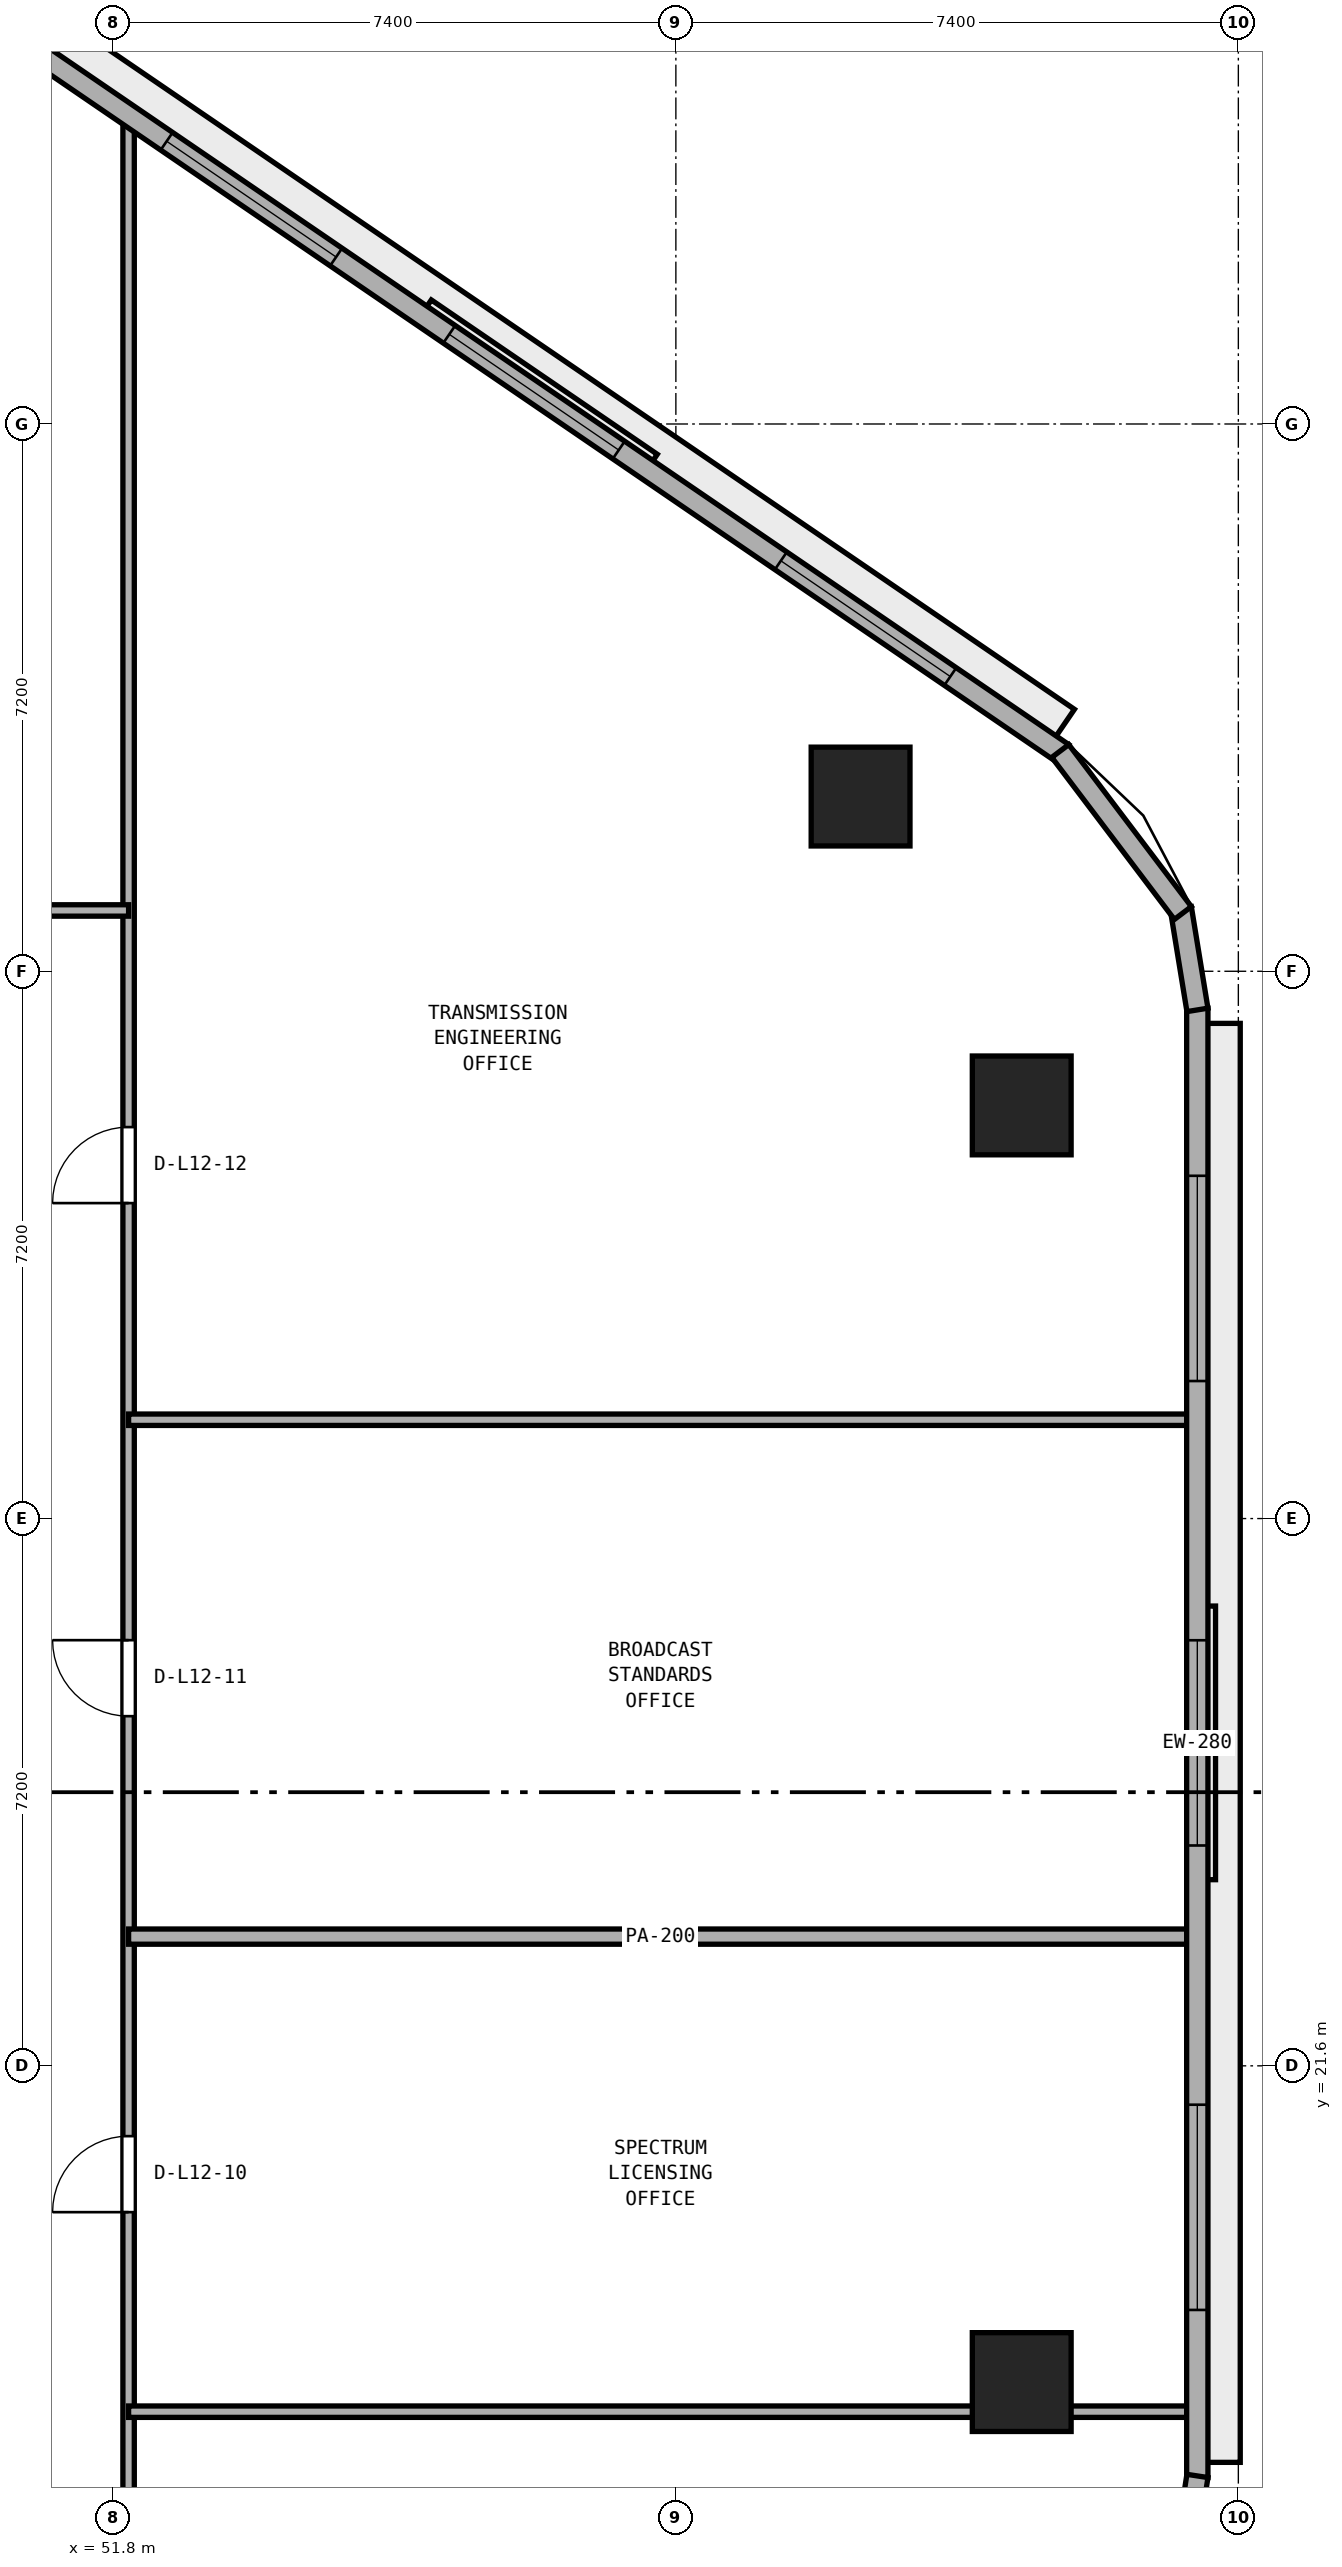
"""IFC4 building model, lengths in metres.
Left out: names, types, materials, properties, quantities, classifications, styles, units other than length and angle.
Written with IfcOpenShell. Run it as: python <this file> out.ifc"""

import sys

from ifc_helpers import new_model, si_unit, direction, frame, frame_2d, origin, origin_2d, place, context, subcontext, project, spatial, rectangle, extrude, element, fill, save


model = new_model("IFC4")
c1 = context("Model", 3, precision=1e-05, world=origin(), true_north=direction((0.0, 1.0)))
c2 = subcontext(c1, "Body", "Model", "MODEL_VIEW")
j1 = project(units=[si_unit("LENGTHUNIT", "METRE"), si_unit("PLANEANGLEUNIT", "RADIAN")], contexts=[c1])
p1 = place(None, origin())
s1 = spatial("IfcSite", under=j1, at=p1, CompositionType="ELEMENT")
p2 = place(p1, origin())
s2 = spatial("IfcBuilding", under=s1, at=p2, CompositionType="ELEMENT")
p3 = place(p2, frame((0.0, 0.0, 51.6)))
s3 = spatial("IfcBuildingStorey", under=s2, at=p3, CompositionType="ELEMENT", Elevation=51.6)
for number, where, z_axis, x_axis in (
    (1, (63.75, 17.44, 0.0), (0.0, 0.0, 1.0), (1.0, 0.0, 0.0)),
    (2, (63.75, 34.235, 0.0), (0.0, 0.0, 1.0), (1.0, 0.0, 0.0)),
    (3, (61.63, 38.299, 0.0), (0.0, 0.0, 1.0), (1.0, 0.0, 0.0)),
):
    element("IfcColumn", number, at=place(p3, frame(where, z_axis=z_axis, x_axis=x_axis)), inside=s3, PredefinedType="COLUMN", context=c2, shape_type="SweptSolid", body=[
        extrude(rectangle(XDim=1.3, YDim=1.3, at=origin_2d()), origin(), (0.0, 0.0, 1.0), 3.8),
    ])
p4 = place(p3, frame((52.0, 13.6, 0.0), z_axis=(0.0, 0.0, 1.0), x_axis=(0.0, 1.0, 0.0)))
e4 = element("IfcWall", 4, at=p4, inside=s3, PredefinedType="PARTITIONING", context=c2, shape_type="SweptSolid", body=[
    extrude(rectangle(XDim=33.691, YDim=0.15, at=frame_2d((16.846, 0.0))), origin(), (0.0, 0.0, 1.0), 3.525),
])
p5 = place(p4, frame((6.075, 0.0, 0.0)))
e5 = element("IfcOpeningElement", 5, at=p5, cuts=e4, PredefinedType="OPENING", context=c2, shape_type="SweptSolid", body=[
    extrude(rectangle(XDim=1.0, YDim=2.12, at=frame_2d((0.5, 1.06))), frame((0.0, 0.085, 0.0), z_axis=(0.0, -1.0, 0.0), x_axis=(1.0, 0.0, 0.0)), (0.0, 0.0, 1.0), 0.17),
])
p6 = place(p4, frame((12.6, 0.0, 0.0)))
e6 = element("IfcOpeningElement", 6, at=p6, cuts=e4, PredefinedType="OPENING", context=c2, shape_type="SweptSolid", body=[
    extrude(rectangle(XDim=1.0, YDim=2.12, at=frame_2d((0.5, 1.06))), frame((0.0, 0.085, 0.0), z_axis=(0.0, -1.0, 0.0), x_axis=(1.0, 0.0, 0.0)), (0.0, 0.0, 1.0), 0.17),
])
p7 = place(p4, frame((19.35, 0.0, 0.0)))
e7 = element("IfcOpeningElement", 7, at=p7, cuts=e4, PredefinedType="OPENING", context=c2, shape_type="SweptSolid", body=[
    extrude(rectangle(XDim=1.0, YDim=2.12, at=frame_2d((0.5, 1.06))), frame((0.0, 0.085, 0.0), z_axis=(0.0, -1.0, 0.0), x_axis=(1.0, 0.0, 0.0)), (0.0, 0.0, 1.0), 0.17),
])
p8 = place(p3, frame((52.0, 17.05, 0.0), z_axis=(0.0, 0.0, 1.0), x_axis=(1.0, 0.0, 0.0)))
e8 = element("IfcWall", 8, at=p8, inside=s3, PredefinedType="PARTITIONING", context=c2, shape_type="SweptSolid", body=[
    extrude(rectangle(XDim=13.995, YDim=0.15, at=frame_2d((6.998, 0.0))), origin(), (0.0, 0.0, 1.0), 3.525),
])
p9 = place(p3, frame((52.0, 23.3, 0.0), z_axis=(0.0, 0.0, 1.0), x_axis=(1.0, 0.0, 0.0)))
e9 = element("IfcWall", 9, at=p9, inside=s3, PredefinedType="PARTITIONING", context=c2, shape_type="SweptSolid", body=[
    extrude(rectangle(XDim=13.995, YDim=0.2, at=frame_2d((6.998, 0.0))), origin(), (0.0, 0.0, 1.0), 3.525),
])
p10 = place(p3, frame((52.0, 30.1, 0.0), z_axis=(0.0, 0.0, 1.0), x_axis=(1.0, 0.0, 0.0)))
e10 = element("IfcWall", 10, at=p10, inside=s3, PredefinedType="PARTITIONING", context=c2, shape_type="SweptSolid", body=[
    extrude(rectangle(XDim=13.995, YDim=0.15, at=frame_2d((6.998, 0.0))), origin(), (0.0, 0.0, 1.0), 3.525),
])
p11 = place(p3, frame((22.0, 36.8, 0.0), z_axis=(0.0, 0.0, 1.0), x_axis=(1.0, 0.0, 0.0)))
e11 = element("IfcWall", 11, at=p11, inside=s3, PredefinedType="PARTITIONING", context=c2, shape_type="SweptSolid", body=[
    extrude(rectangle(XDim=30.0, YDim=0.15, at=frame_2d((15.0, 0.0))), origin(), (0.0, 0.0, 1.0), 3.525),
])
p12 = place(p11, frame((3.67, 0.0, 0.0)))
e12 = element("IfcOpeningElement", 12, at=p12, cuts=e11, PredefinedType="OPENING", context=c2, shape_type="SweptSolid", body=[
    extrude(rectangle(XDim=1.0, YDim=2.12, at=frame_2d((0.5, 1.06))), frame((0.0, 0.085, 0.0), z_axis=(0.0, -1.0, 0.0), x_axis=(1.0, 0.0, 0.0)), (0.0, 0.0, 1.0), 0.17),
])
p13 = place(p11, frame((11.9, 0.0, 0.0)))
e13 = element("IfcOpeningElement", 13, at=p13, cuts=e11, PredefinedType="OPENING", context=c2, shape_type="SweptSolid", body=[
    extrude(rectangle(XDim=1.0, YDim=2.12, at=frame_2d((0.5, 1.06))), frame((0.0, 0.085, 0.0), z_axis=(0.0, -1.0, 0.0), x_axis=(1.0, 0.0, 0.0)), (0.0, 0.0, 1.0), 0.17),
])
p14 = place(p11, frame((20.4, 0.0, 0.0)))
e14 = element("IfcOpeningElement", 14, at=p14, cuts=e11, PredefinedType="OPENING", context=c2, shape_type="SweptSolid", body=[
    extrude(rectangle(XDim=1.0, YDim=2.12, at=frame_2d((0.5, 1.06))), frame((0.0, 0.085, 0.0), z_axis=(0.0, -1.0, 0.0), x_axis=(1.0, 0.0, 0.0)), (0.0, 0.0, 1.0), 0.17),
])
p15 = place(p11, frame((26.93, 0.0, 0.0)))
e15 = element("IfcOpeningElement", 15, at=p15, cuts=e11, PredefinedType="OPENING", context=c2, shape_type="SweptSolid", body=[
    extrude(rectangle(XDim=1.0, YDim=2.12, at=frame_2d((0.5, 1.06))), frame((0.0, 0.085, 0.0), z_axis=(0.0, -1.0, 0.0), x_axis=(1.0, 0.0, 0.0)), (0.0, 0.0, 1.0), 0.17),
])
p16 = place(p3, frame((66.06, 16.183, 0.0), z_axis=(0.0, 0.0, 1.0), x_axis=(0.0, 1.0, 0.0)))
e16 = element("IfcWall", 16, at=p16, inside=s3, PredefinedType="STANDARD", context=c2, shape_type="SweptSolid", body=[
    extrude(rectangle(XDim=19.331, YDim=0.28, at=frame_2d((9.666, 0.0))), origin(), (0.0, 0.0, 1.0), 3.525),
])
p17 = place(p16, frame((2.205, 0.0, 0.9)))
e17 = element("IfcOpeningElement", 17, at=p17, cuts=e16, PredefinedType="OPENING", context=c2, shape_type="SweptSolid", body=[
    extrude(rectangle(XDim=2.7, YDim=1.75, at=frame_2d((1.35, 0.875))), frame((0.0, 0.15, 0.0), z_axis=(0.0, -1.0, 0.0), x_axis=(1.0, 0.0, 0.0)), (0.0, 0.0, 1.0), 0.3),
])
p18 = place(p16, frame((8.315, 0.0, 0.9)))
e18 = element("IfcOpeningElement", 18, at=p18, cuts=e16, PredefinedType="OPENING", context=c2, shape_type="SweptSolid", body=[
    extrude(rectangle(XDim=2.7, YDim=1.75, at=frame_2d((1.35, 0.875))), frame((0.0, 0.15, 0.0), z_axis=(0.0, -1.0, 0.0), x_axis=(1.0, 0.0, 0.0)), (0.0, 0.0, 1.0), 0.3),
])
p19 = place(p16, frame((14.426, 0.0, 0.9)))
e19 = element("IfcOpeningElement", 19, at=p19, cuts=e16, PredefinedType="OPENING", context=c2, shape_type="SweptSolid", body=[
    extrude(rectangle(XDim=2.7, YDim=1.75, at=frame_2d((1.35, 0.875))), frame((0.0, 0.15, 0.0), z_axis=(0.0, -1.0, 0.0), x_axis=(1.0, 0.0, 0.0)), (0.0, 0.0, 1.0), 0.3),
])
p20 = place(p3, frame((64.29, 38.867, 0.0), z_axis=(0.0, 0.0, 1.0), x_axis=(-0.825755550159, 0.564028165416, 0.0)))
e20 = element("IfcWall", 20, at=p20, inside=s3, PredefinedType="STANDARD", context=c2, shape_type="SweptSolid", body=[
    extrude(rectangle(XDim=16.848, YDim=0.28, at=frame_2d((8.424, 0.0))), origin(), (0.0, 0.0, 1.0), 3.525),
])
p21 = place(p20, frame((1.792, 0.0, 0.9)))
e21 = element("IfcOpeningElement", 21, at=p21, cuts=e20, PredefinedType="OPENING", context=c2, shape_type="SweptSolid", body=[
    extrude(rectangle(XDim=2.7, YDim=1.75, at=frame_2d((1.35, 0.875))), frame((0.0, 0.15, 0.0), z_axis=(0.0, -1.0, 0.0), x_axis=(1.0, 0.0, 0.0)), (0.0, 0.0, 1.0), 0.3),
])
p22 = place(p20, frame((7.074, 0.0, 0.9)))
e22 = element("IfcOpeningElement", 22, at=p22, cuts=e20, PredefinedType="OPENING", context=c2, shape_type="SweptSolid", body=[
    extrude(rectangle(XDim=2.7, YDim=1.75, at=frame_2d((1.35, 0.875))), frame((0.0, 0.15, 0.0), z_axis=(0.0, -1.0, 0.0), x_axis=(1.0, 0.0, 0.0)), (0.0, 0.0, 1.0), 0.3),
])
p23 = place(p20, frame((11.577, 0.0, 0.9)))
e23 = element("IfcOpeningElement", 23, at=p23, cuts=e20, PredefinedType="OPENING", context=c2, shape_type="SweptSolid", body=[
    extrude(rectangle(XDim=2.7, YDim=1.75, at=frame_2d((1.35, 0.875))), frame((0.0, 0.15, 0.0), z_axis=(0.0, -1.0, 0.0), x_axis=(1.0, 0.0, 0.0)), (0.0, 0.0, 1.0), 0.3),
])
p24 = place(p3, frame((65.867, 14.943, 0.0), z_axis=(0.0, 0.0, 1.0), x_axis=(0.152014078361, 0.988378328364, 0.0)))
e24 = element("IfcWall", 24, at=p24, inside=s3, PredefinedType="STANDARD", context=c2, shape_type="SweptSolid", body=[
    extrude(rectangle(XDim=1.277, YDim=0.28, at=frame_2d((0.638, 0.0))), origin(), (0.0, 0.0, 1.0), 3.525),
])
p25 = place(p3, frame((66.062, 35.492, 0.0), z_axis=(0.0, 0.0, 1.0), x_axis=(-0.161182073582, 0.986924687682, 0.0)))
e25 = element("IfcWall", 25, at=p25, inside=s3, PredefinedType="STANDARD", context=c2, shape_type="SweptSolid", body=[
    extrude(rectangle(XDim=1.354, YDim=0.28, at=frame_2d((0.677, 0.0))), origin(), (0.0, 0.0, 1.0), 3.525),
])
p26 = place(p3, frame((65.87, 36.767, 0.0), z_axis=(0.0, 0.0, 1.0), x_axis=(-0.603370463754, 0.797461023166, 0.0)))
e26 = element("IfcWall", 26, at=p26, inside=s3, PredefinedType="STANDARD", context=c2, shape_type="SweptSolid", body=[
    extrude(rectangle(XDim=2.673, YDim=0.28, at=frame_2d((1.336, 0.0))), origin(), (0.0, 0.0, 1.0), 3.525),
])
p27 = place(p5, origin())
e27 = element("IfcDoor", 27, at=p27, inside=s3, OperationType="SINGLE_SWING_LEFT", PredefinedType="DOOR", context=c2, shape_type="SweptSolid", body=[
    extrude(rectangle(XDim=1.0, YDim=2.12, at=frame_2d((0.5, 1.06))), frame((0.0, 0.025, 0.0), z_axis=(0.0, -1.0, 0.0), x_axis=(1.0, 0.0, 0.0)), (0.0, 0.0, 1.0), 0.05),
])
fill(e5, e27)
p28 = place(p6, origin())
e28 = element("IfcDoor", 28, at=p28, inside=s3, OperationType="SINGLE_SWING_RIGHT", PredefinedType="DOOR", context=c2, shape_type="SweptSolid", body=[
    extrude(rectangle(XDim=1.0, YDim=2.12, at=frame_2d((0.5, 1.06))), frame((0.0, 0.025, 0.0), z_axis=(0.0, -1.0, 0.0), x_axis=(1.0, 0.0, 0.0)), (0.0, 0.0, 1.0), 0.05),
])
fill(e6, e28)
p29 = place(p7, origin())
e29 = element("IfcDoor", 29, at=p29, inside=s3, OperationType="SINGLE_SWING_LEFT", PredefinedType="DOOR", context=c2, shape_type="SweptSolid", body=[
    extrude(rectangle(XDim=1.0, YDim=2.12, at=frame_2d((0.5, 1.06))), frame((0.0, 0.025, 0.0), z_axis=(0.0, -1.0, 0.0), x_axis=(1.0, 0.0, 0.0)), (0.0, 0.0, 1.0), 0.05),
])
fill(e7, e29)
p30 = place(p17, origin())
e30 = element("IfcWindow", 30, at=p30, inside=s3, PartitioningType="SINGLE_PANEL", PredefinedType="WINDOW", context=c2, shape_type="SweptSolid", body=[
    extrude(rectangle(XDim=2.7, YDim=1.75, at=frame_2d((1.35, 0.875))), frame((0.0, 0.03, 0.0), z_axis=(0.0, -1.0, 0.0), x_axis=(1.0, 0.0, 0.0)), (0.0, 0.0, 1.0), 0.06),
])
fill(e17, e30)
p31 = place(p18, origin())
e31 = element("IfcWindow", 31, at=p31, inside=s3, PartitioningType="SINGLE_PANEL", PredefinedType="WINDOW", context=c2, shape_type="SweptSolid", body=[
    extrude(rectangle(XDim=2.7, YDim=1.75, at=frame_2d((1.35, 0.875))), frame((0.0, 0.03, 0.0), z_axis=(0.0, -1.0, 0.0), x_axis=(1.0, 0.0, 0.0)), (0.0, 0.0, 1.0), 0.06),
])
fill(e18, e31)
p32 = place(p19, origin())
e32 = element("IfcWindow", 32, at=p32, inside=s3, PartitioningType="SINGLE_PANEL", PredefinedType="WINDOW", context=c2, shape_type="SweptSolid", body=[
    extrude(rectangle(XDim=2.7, YDim=1.75, at=frame_2d((1.35, 0.875))), frame((0.0, 0.03, 0.0), z_axis=(0.0, -1.0, 0.0), x_axis=(1.0, 0.0, 0.0)), (0.0, 0.0, 1.0), 0.06),
])
fill(e19, e32)
p33 = place(p21, origin())
e33 = element("IfcWindow", 33, at=p33, inside=s3, PartitioningType="SINGLE_PANEL", PredefinedType="WINDOW", context=c2, shape_type="SweptSolid", body=[
    extrude(rectangle(XDim=2.7, YDim=1.75, at=frame_2d((1.35, 0.875))), frame((0.0, 0.03, 0.0), z_axis=(0.0, -1.0, 0.0), x_axis=(1.0, 0.0, 0.0)), (0.0, 0.0, 1.0), 0.06),
])
fill(e21, e33)
p34 = place(p22, origin())
e34 = element("IfcWindow", 34, at=p34, inside=s3, PartitioningType="SINGLE_PANEL", PredefinedType="WINDOW", context=c2, shape_type="SweptSolid", body=[
    extrude(rectangle(XDim=2.7, YDim=1.75, at=frame_2d((1.35, 0.875))), frame((0.0, 0.03, 0.0), z_axis=(0.0, -1.0, 0.0), x_axis=(1.0, 0.0, 0.0)), (0.0, 0.0, 1.0), 0.06),
])
fill(e22, e34)
p35 = place(p23, origin())
e35 = element("IfcWindow", 35, at=p35, inside=s3, PartitioningType="SINGLE_PANEL", PredefinedType="WINDOW", context=c2, shape_type="SweptSolid", body=[
    extrude(rectangle(XDim=2.7, YDim=1.75, at=frame_2d((1.35, 0.875))), frame((0.0, 0.03, 0.0), z_axis=(0.0, -1.0, 0.0), x_axis=(1.0, 0.0, 0.0)), (0.0, 0.0, 1.0), 0.06),
])
fill(e23, e35)
save(model, sys.argv[1])
